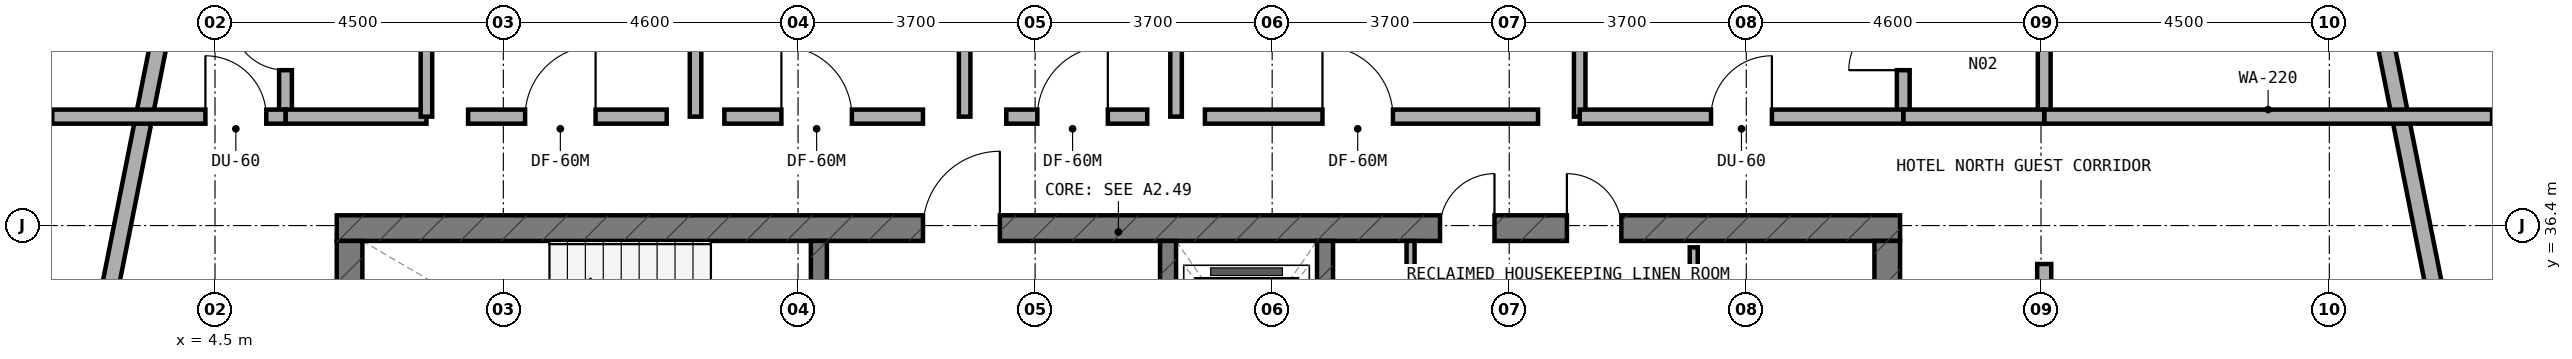
"""IFC4 building model, lengths in metres.
Left out: names, types, materials, properties, quantities, classifications, styles, units other than length and angle.
Written with IfcOpenShell. Run it as: python <this file> out.ifc"""

import sys

from ifc_helpers import new_model, si_unit, direction, frame, frame_2d, origin, place, context, subcontext, project, spatial, rectangle, extrude, element, fill, save


model = new_model("IFC4")
c1 = context("Model", 3, precision=1e-05, world=origin(), true_north=direction((0.0, 1.0)))
c2 = subcontext(c1, "Body", "Model", "MODEL_VIEW")
j1 = project(units=[si_unit("LENGTHUNIT", "METRE"), si_unit("PLANEANGLEUNIT", "RADIAN")], contexts=[c1])
p1 = place(None, origin())
s1 = spatial("IfcSite", under=j1, at=p1, CompositionType="ELEMENT")
p2 = place(p1, origin())
s2 = spatial("IfcBuilding", under=s1, at=p2, CompositionType="ELEMENT")
p3 = place(p2, frame((0.0, 0.0, 231.5)))
s3 = spatial("IfcBuildingStorey", under=s2, at=p3, CompositionType="ELEMENT", Elevation=231.5)
p4 = place(p3, frame((6.4, 36.36, 0.0), z_axis=(0.0, 0.0, 1.0), x_axis=(1.0, 0.0, 0.0)))
e1 = element("IfcWall", 1, at=p4, inside=s3, PredefinedType="SHEAR", context=c2, shape_type="SweptSolid", body=[
    extrude(rectangle(XDim=24.4, YDim=0.4, at=frame_2d((12.2, 0.0))), origin(), (0.0, 0.0, 1.0), 3.6),
])
p5 = place(p4, frame((9.15, 0.0, 0.0)))
e2 = element("IfcOpeningElement", 2, at=p5, cuts=e1, PredefinedType="OPENING", context=c2, shape_type="SweptSolid", body=[
    extrude(rectangle(XDim=1.2, YDim=2.15, at=frame_2d((0.6, 1.075))), frame((0.0, 0.21, 0.0), z_axis=(0.0, -1.0, 0.0), x_axis=(1.0, 0.0, 0.0)), (0.0, 0.0, 1.0), 0.42),
])
p6 = place(p4, frame((19.2, 0.0, 0.0)))
e3 = element("IfcOpeningElement", 3, at=p6, cuts=e1, PredefinedType="OPENING", context=c2, shape_type="SweptSolid", body=[
    extrude(rectangle(XDim=0.85, YDim=2.1, at=frame_2d((0.425, 1.05))), frame((0.0, 0.21, 0.0), z_axis=(0.0, -1.0, 0.0), x_axis=(1.0, 0.0, 0.0)), (0.0, 0.0, 1.0), 0.42),
])
p7 = place(p4, frame((17.22, 0.0, 0.0)))
e4 = element("IfcOpeningElement", 4, at=p7, cuts=e1, PredefinedType="OPENING", context=c2, shape_type="SweptSolid", body=[
    extrude(rectangle(XDim=0.85, YDim=2.1, at=frame_2d((0.425, 1.05))), frame((0.0, 0.21, 0.0), z_axis=(0.0, -1.0, 0.0), x_axis=(1.0, 0.0, 0.0)), (0.0, 0.0, 1.0), 0.42),
])
for number, where, z_axis, x_axis in (
    (5, (6.6, 33.0, 0.0), (0.0, 0.0, 1.0), (0.0, 1.0, 0.0)),
    (6, (30.6, 33.0, 0.0), (0.0, 0.0, 1.0), (0.0, 1.0, 0.0)),
):
    element("IfcWall", number, at=place(p3, frame(where, z_axis=z_axis, x_axis=x_axis)), inside=s3, PredefinedType="SHEAR", context=c2, shape_type="SweptSolid", body=[
        extrude(rectangle(XDim=3.16, YDim=0.4, at=frame_2d((1.58, 0.0))), origin(), (0.0, 0.0, 1.0), 3.6),
    ])
p8 = place(p3, frame((13.925, 33.0, 0.0), z_axis=(0.0, 0.0, 1.0), x_axis=(0.0, 1.0, 0.0)))
e7 = element("IfcWall", 7, at=p8, inside=s3, PredefinedType="STANDARD", context=c2, shape_type="SweptSolid", body=[
    extrude(rectangle(XDim=3.16, YDim=0.25, at=frame_2d((1.58, 0.0))), origin(), (0.0, 0.0, 1.0), 3.32),
])
p9 = place(p8, frame((0.98, 0.0, 0.0)))
e8 = element("IfcOpeningElement", 8, at=p9, cuts=e7, PredefinedType="OPENING", context=c2, shape_type="SweptSolid", body=[
    extrude(rectangle(XDim=1.1, YDim=2.15, at=frame_2d((0.55, 1.075))), frame((0.0, 0.135, 0.0), z_axis=(0.0, -1.0, 0.0), x_axis=(1.0, 0.0, 0.0)), (0.0, 0.0, 1.0), 0.27),
])
p10 = place(p3, frame((19.375, 33.0, 0.0), z_axis=(0.0, 0.0, 1.0), x_axis=(0.0, 1.0, 0.0)))
e9 = element("IfcWall", 9, at=p10, inside=s3, PredefinedType="STANDARD", context=c2, shape_type="SweptSolid", body=[
    extrude(rectangle(XDim=3.16, YDim=0.25, at=frame_2d((1.58, 0.0))), origin(), (0.0, 0.0, 1.0), 3.32),
])
p11 = place(p10, frame((0.98, 0.0, 0.0)))
e10 = element("IfcOpeningElement", 10, at=p11, cuts=e9, PredefinedType="OPENING", context=c2, shape_type="SweptSolid", body=[
    extrude(rectangle(XDim=1.1, YDim=2.15, at=frame_2d((0.55, 1.075))), frame((0.0, 0.135, 0.0), z_axis=(0.0, -1.0, 0.0), x_axis=(1.0, 0.0, 0.0)), (0.0, 0.0, 1.0), 0.27),
])
p12 = place(p3, frame((21.825, 33.0, 0.0), z_axis=(0.0, 0.0, 1.0), x_axis=(0.0, 1.0, 0.0)))
e11 = element("IfcWall", 11, at=p12, inside=s3, PredefinedType="STANDARD", context=c2, shape_type="SweptSolid", body=[
    extrude(rectangle(XDim=3.16, YDim=0.25, at=frame_2d((1.58, 0.0))), origin(), (0.0, 0.0, 1.0), 3.32),
])
p13 = place(p3, frame((40.084, 30.681, 0.0), z_axis=(0.0, 0.0, 1.0), x_axis=(-0.195291715883, 0.980745199176, 0.0)))
e12 = element("IfcWall", 12, at=p13, inside=s3, PredefinedType="STANDARD", context=c2, shape_type="SweptSolid", body=[
    extrude(rectangle(XDim=8.771, YDim=0.26, at=frame_2d((4.385, 0.0))), origin(), (0.0, 0.0, 1.0), 3.32),
])
p14 = place(p13, frame((2.67, 0.0, 0.85)))
e13 = element("IfcOpeningElement", 13, at=p14, cuts=e12, PredefinedType="OPENING", context=c2, shape_type="SweptSolid", body=[
    extrude(rectangle(XDim=2.1, YDim=1.5, at=frame_2d((1.05, 0.75))), frame((0.0, 0.14, 0.0), z_axis=(0.0, -1.0, 0.0), x_axis=(1.0, 0.0, 0.0)), (0.0, 0.0, 1.0), 0.28),
])
p15 = place(p3, frame((3.629, 39.283, 0.0), z_axis=(0.0, 0.0, 1.0), x_axis=(-0.195291715883, -0.980745199176, 0.0)))
e14 = element("IfcWall", 14, at=p15, inside=s3, PredefinedType="STANDARD", context=c2, shape_type="SweptSolid", body=[
    extrude(rectangle(XDim=8.771, YDim=0.26, at=frame_2d((4.385, 0.0))), origin(), (0.0, 0.0, 1.0), 3.32),
])
p16 = place(p15, frame((4.0, 0.0, 0.85)))
e15 = element("IfcOpeningElement", 15, at=p16, cuts=e14, PredefinedType="OPENING", context=c2, shape_type="SweptSolid", body=[
    extrude(rectangle(XDim=2.1, YDim=1.5, at=frame_2d((1.05, 0.75))), frame((0.0, 0.14, 0.0), z_axis=(0.0, -1.0, 0.0), x_axis=(1.0, 0.0, 0.0)), (0.0, 0.0, 1.0), 0.28),
])
p17 = place(p3, frame((27.58, 33.1, 0.0), z_axis=(0.0, 0.0, 1.0), x_axis=(0.0, 1.0, 0.0)))
e16 = element("IfcWall", 16, at=p17, inside=s3, PredefinedType="PARTITIONING", context=c2, shape_type="SweptSolid", body=[
    extrude(rectangle(XDim=2.96, YDim=0.125, at=frame_2d((1.48, 0.0))), origin(), (0.0, 0.0, 1.0), 3.32),
])
p18 = place(p17, frame((1.055, 0.0, 0.0)))
e17 = element("IfcOpeningElement", 17, at=p18, cuts=e16, PredefinedType="OPENING", context=c2, shape_type="SweptSolid", body=[
    extrude(rectangle(XDim=0.85, YDim=2.1, at=frame_2d((0.425, 1.05))), frame((0.0, 0.073, 0.0), z_axis=(0.0, -1.0, 0.0), x_axis=(1.0, 0.0, 0.0)), (0.0, 0.0, 1.0), 0.145),
])
p19 = place(p3, frame((23.16, 34.82, 0.0), z_axis=(0.0, 0.0, 1.0), x_axis=(0.0, 1.0, 0.0)))
e18 = element("IfcWall", 18, at=p19, inside=s3, PredefinedType="PARTITIONING", context=c2, shape_type="SweptSolid", body=[
    extrude(rectangle(XDim=1.34, YDim=0.125, at=frame_2d((0.67, 0.0))), origin(), (0.0, 0.0, 1.0), 3.32),
])
p20 = place(p3, frame((5.6, 38.2, 0.0), z_axis=(0.0, 0.0, 1.0), x_axis=(0.0, 1.0, 0.0)))
e19 = element("IfcWall", 19, at=p20, inside=s3, PredefinedType="PLUMBINGWALL", context=c2, shape_type="SweptSolid", body=[
    extrude(rectangle(XDim=2.1, YDim=0.2, at=frame_2d((1.05, 0.0))), origin(), (0.0, 0.0, 1.0), 3.32),
])
p21 = place(p20, frame((0.625, 0.0, 0.0)))
e20 = element("IfcOpeningElement", 20, at=p21, cuts=e19, PredefinedType="OPENING", context=c2, shape_type="SweptSolid", body=[
    extrude(rectangle(XDim=0.85, YDim=2.1, at=frame_2d((0.425, 1.05))), frame((0.0, 0.11, 0.0), z_axis=(0.0, -1.0, 0.0), x_axis=(1.0, 0.0, 0.0)), (0.0, 0.0, 1.0), 0.22),
])
p22 = place(p3, frame((5.6, 38.1, 0.0), z_axis=(0.0, 0.0, 1.0), x_axis=(1.0, 0.0, 0.0)))
e21 = element("IfcWall", 21, at=p22, inside=s3, PredefinedType="SOLIDWALL", context=c2, shape_type="SweptSolid", body=[
    extrude(rectangle(XDim=2.2, YDim=0.22, at=frame_2d((1.1, 0.0))), origin(), (0.0, 0.0, 1.0), 2.745),
])
p23 = place(p3, frame((1.96, 38.1, 0.0), z_axis=(0.0, 0.0, 1.0), x_axis=(1.0, 0.0, 0.0)))
e22 = element("IfcWall", 22, at=p23, inside=s3, PredefinedType="SOLIDWALL", context=c2, shape_type="SweptSolid", body=[
    extrude(rectangle(XDim=3.64, YDim=0.22, at=frame_2d((1.82, 0.0))), origin(), (0.0, 0.0, 1.0), 3.32),
])
p24 = place(p23, frame((2.39, 0.0, 0.0)))
e23 = element("IfcOpeningElement", 23, at=p24, cuts=e22, PredefinedType="OPENING", context=c2, shape_type="SweptSolid", body=[
    extrude(rectangle(XDim=0.95, YDim=2.1, at=frame_2d((0.475, 1.05))), frame((0.0, 0.12, 0.0), z_axis=(0.0, -1.0, 0.0), x_axis=(1.0, 0.0, 0.0)), (0.0, 0.0, 1.0), 0.24),
])
p25 = place(p3, frame((7.8, 38.1, 0.0), z_axis=(0.0, 0.0, 1.0), x_axis=(0.0, 1.0, 0.0)))
e24 = element("IfcWall", 24, at=p25, inside=s3, PredefinedType="SOLIDWALL", context=c2, shape_type="SweptSolid", body=[
    extrude(rectangle(XDim=4.558, YDim=0.18, at=frame_2d((2.279, 0.0))), origin(), (0.0, 0.0, 1.0), 2.745),
])
p26 = place(p3, frame((12.0, 38.1, 0.0), z_axis=(0.0, 0.0, 1.0), x_axis=(0.0, 1.0, 0.0)))
e25 = element("IfcWall", 25, at=p26, inside=s3, PredefinedType="SOLIDWALL", context=c2, shape_type="SweptSolid", body=[
    extrude(rectangle(XDim=5.394, YDim=0.18, at=frame_2d((2.697, 0.0))), origin(), (0.0, 0.0, 1.0), 2.895),
])
p27 = place(p3, frame((8.45, 38.1, 0.0), z_axis=(0.0, 0.0, 1.0), x_axis=(1.0, 0.0, 0.0)))
e26 = element("IfcWall", 26, at=p27, inside=s3, PredefinedType="SOLIDWALL", context=c2, shape_type="SweptSolid", body=[
    extrude(rectangle(XDim=3.1, YDim=0.22, at=frame_2d((1.55, 0.0))), origin(), (0.0, 0.0, 1.0), 3.32),
])
p28 = place(p27, frame((0.89, 0.0, 0.0)))
e27 = element("IfcOpeningElement", 27, at=p28, cuts=e26, PredefinedType="OPENING", context=c2, shape_type="SweptSolid", body=[
    extrude(rectangle(XDim=1.1, YDim=2.1, at=frame_2d((0.55, 1.05))), frame((0.0, 0.12, 0.0), z_axis=(0.0, -1.0, 0.0), x_axis=(1.0, 0.0, 0.0)), (0.0, 0.0, 1.0), 0.24),
])
p29 = place(p3, frame((12.45, 38.1, 0.0), z_axis=(0.0, 0.0, 1.0), x_axis=(1.0, 0.0, 0.0)))
e28 = element("IfcWall", 28, at=p29, inside=s3, PredefinedType="SOLIDWALL", context=c2, shape_type="SweptSolid", body=[
    extrude(rectangle(XDim=3.1, YDim=0.22, at=frame_2d((1.55, 0.0))), origin(), (0.0, 0.0, 1.0), 3.32),
])
p30 = place(p29, frame((0.89, 0.0, 0.0)))
e29 = element("IfcOpeningElement", 29, at=p30, cuts=e28, PredefinedType="OPENING", context=c2, shape_type="SweptSolid", body=[
    extrude(rectangle(XDim=1.1, YDim=2.1, at=frame_2d((0.55, 1.05))), frame((0.0, 0.12, 0.0), z_axis=(0.0, -1.0, 0.0), x_axis=(1.0, 0.0, 0.0)), (0.0, 0.0, 1.0), 0.24),
])
p31 = place(p3, frame((16.2, 38.1, 0.0), z_axis=(0.0, 0.0, 1.0), x_axis=(0.0, 1.0, 0.0)))
e30 = element("IfcWall", 30, at=p31, inside=s3, PredefinedType="SOLIDWALL", context=c2, shape_type="SweptSolid", body=[
    extrude(rectangle(XDim=6.04, YDim=0.18, at=frame_2d((3.02, 0.0))), origin(), (0.0, 0.0, 1.0), 2.745),
])
p32 = place(p3, frame((19.5, 38.1, 0.0), z_axis=(0.0, 0.0, 1.0), x_axis=(0.0, 1.0, 0.0)))
e31 = element("IfcWall", 31, at=p32, inside=s3, PredefinedType="SOLIDWALL", context=c2, shape_type="SweptSolid", body=[
    extrude(rectangle(XDim=6.04, YDim=0.18, at=frame_2d((3.02, 0.0))), origin(), (0.0, 0.0, 1.0), 2.895),
])
p33 = place(p3, frame((16.85, 38.1, 0.0), z_axis=(0.0, 0.0, 1.0), x_axis=(1.0, 0.0, 0.0)))
e32 = element("IfcWall", 32, at=p33, inside=s3, PredefinedType="SOLIDWALL", context=c2, shape_type="SweptSolid", body=[
    extrude(rectangle(XDim=2.2, YDim=0.22, at=frame_2d((1.1, 0.0))), origin(), (0.0, 0.0, 1.0), 3.32),
])
p34 = place(p33, frame((0.485, 0.0, 0.0)))
e33 = element("IfcOpeningElement", 33, at=p34, cuts=e32, PredefinedType="OPENING", context=c2, shape_type="SweptSolid", body=[
    extrude(rectangle(XDim=1.1, YDim=2.1, at=frame_2d((0.55, 1.05))), frame((0.0, 0.12, 0.0), z_axis=(0.0, -1.0, 0.0), x_axis=(1.0, 0.0, 0.0)), (0.0, 0.0, 1.0), 0.24),
])
p35 = place(p3, frame((19.95, 38.1, 0.0), z_axis=(0.0, 0.0, 1.0), x_axis=(1.0, 0.0, 0.0)))
e34 = element("IfcWall", 34, at=p35, inside=s3, PredefinedType="SOLIDWALL", context=c2, shape_type="SweptSolid", body=[
    extrude(rectangle(XDim=5.2, YDim=0.22, at=frame_2d((2.6, 0.0))), origin(), (0.0, 0.0, 1.0), 3.32),
])
p36 = place(p35, frame((1.835, 0.0, 0.0)))
e35 = element("IfcOpeningElement", 35, at=p36, cuts=e34, PredefinedType="OPENING", context=c2, shape_type="SweptSolid", body=[
    extrude(rectangle(XDim=1.1, YDim=2.1, at=frame_2d((0.55, 1.05))), frame((0.0, 0.12, 0.0), z_axis=(0.0, -1.0, 0.0), x_axis=(1.0, 0.0, 0.0)), (0.0, 0.0, 1.0), 0.24),
])
p37 = place(p3, frame((25.8, 38.1, 0.0), z_axis=(0.0, 0.0, 1.0), x_axis=(0.0, 1.0, 0.0)))
e36 = element("IfcWall", 36, at=p37, inside=s3, PredefinedType="SOLIDWALL", context=c2, shape_type="SweptSolid", body=[
    extrude(rectangle(XDim=6.04, YDim=0.18, at=frame_2d((3.02, 0.0))), origin(), (0.0, 0.0, 1.0), 2.745),
])
p38 = place(p3, frame((30.85, 38.2, 0.0), z_axis=(0.0, 0.0, 1.0), x_axis=(0.0, 1.0, 0.0)))
e37 = element("IfcWall", 37, at=p38, inside=s3, PredefinedType="PLUMBINGWALL", context=c2, shape_type="SweptSolid", body=[
    extrude(rectangle(XDim=2.1, YDim=0.2, at=frame_2d((1.05, 0.0))), origin(), (0.0, 0.0, 1.0), 2.895),
])
p39 = place(p38, frame((0.625, 0.0, 0.0)))
e38 = element("IfcOpeningElement", 38, at=p39, cuts=e37, PredefinedType="OPENING", context=c2, shape_type="SweptSolid", body=[
    extrude(rectangle(XDim=0.85, YDim=2.1, at=frame_2d((0.425, 1.05))), frame((0.0, 0.11, 0.0), z_axis=(0.0, -1.0, 0.0), x_axis=(1.0, 0.0, 0.0)), (0.0, 0.0, 1.0), 0.22),
])
p40 = place(p3, frame((33.05, 38.2, 0.0), z_axis=(0.0, 0.0, 1.0), x_axis=(0.0, 1.0, 0.0)))
e39 = element("IfcWall", 39, at=p40, inside=s3, PredefinedType="PLUMBINGWALL", context=c2, shape_type="SweptSolid", body=[
    extrude(rectangle(XDim=2.1, YDim=0.2, at=frame_2d((1.05, 0.0))), origin(), (0.0, 0.0, 1.0), 2.895),
])
p41 = place(p3, frame((33.05, 38.1, 0.0), z_axis=(0.0, 0.0, 1.0), x_axis=(1.0, 0.0, 0.0)))
e40 = element("IfcWall", 40, at=p41, inside=s3, PredefinedType="SOLIDWALL", context=c2, shape_type="SweptSolid", body=[
    extrude(rectangle(XDim=6.99, YDim=0.22, at=frame_2d((3.495, 0.0))), origin(), (0.0, 0.0, 1.0), 2.745),
])
p42 = place(p3, frame((30.85, 38.1, 0.0), z_axis=(0.0, 0.0, 1.0), x_axis=(1.0, 0.0, 0.0)))
e41 = element("IfcWall", 41, at=p42, inside=s3, PredefinedType="SOLIDWALL", context=c2, shape_type="SweptSolid", body=[
    extrude(rectangle(XDim=2.2, YDim=0.22, at=frame_2d((1.1, 0.0))), origin(), (0.0, 0.0, 1.0), 3.32),
])
p43 = place(p3, frame((25.8, 38.1, 0.0), z_axis=(0.0, 0.0, 1.0), x_axis=(1.0, 0.0, 0.0)))
e42 = element("IfcWall", 42, at=p43, inside=s3, PredefinedType="SOLIDWALL", context=c2, shape_type="SweptSolid", body=[
    extrude(rectangle(XDim=5.05, YDim=0.22, at=frame_2d((2.525, 0.0))), origin(), (0.0, 0.0, 1.0), 2.745),
])
p44 = place(p43, frame((2.05, 0.0, 0.0)))
e43 = element("IfcOpeningElement", 43, at=p44, cuts=e42, PredefinedType="OPENING", context=c2, shape_type="SweptSolid", body=[
    extrude(rectangle(XDim=0.95, YDim=2.1, at=frame_2d((0.475, 1.05))), frame((0.0, 0.12, 0.0), z_axis=(0.0, -1.0, 0.0), x_axis=(1.0, 0.0, 0.0)), (0.0, 0.0, 1.0), 0.24),
])
p45 = place(p3, frame((33.05, 30.593, 0.0), z_axis=(0.0, 0.0, 1.0), x_axis=(0.0, 1.0, 0.0)))
e44 = element("IfcWall", 44, at=p45, inside=s3, PredefinedType="SOLIDWALL", context=c2, shape_type="SweptSolid", body=[
    extrude(rectangle(XDim=5.207, YDim=0.22, at=frame_2d((2.604, 0.0))), origin(), (0.0, 0.0, 1.0), 2.745),
])
p46 = place(p45, frame((2.128, 0.0, 0.0)))
e45 = element("IfcOpeningElement", 45, at=p46, cuts=e44, PredefinedType="OPENING", context=c2, shape_type="SweptSolid", body=[
    extrude(rectangle(XDim=0.95, YDim=2.1, at=frame_2d((0.475, 1.05))), frame((0.0, 0.12, 0.0), z_axis=(0.0, -1.0, 0.0), x_axis=(1.0, 0.0, 0.0)), (0.0, 0.0, 1.0), 0.24),
])
p47 = place(p5, origin())
e46 = element("IfcDoor", 46, at=p47, inside=s3, OperationType="SINGLE_SWING_RIGHT", PredefinedType="DOOR", context=c2, shape_type="SweptSolid", body=[
    extrude(rectangle(XDim=1.2, YDim=2.15, at=frame_2d((0.6, 1.075))), frame((0.0, 0.025, 0.0), z_axis=(0.0, -1.0, 0.0), x_axis=(1.0, 0.0, 0.0)), (0.0, 0.0, 1.0), 0.05),
])
fill(e2, e46)
p48 = place(p6, origin())
e47 = element("IfcDoor", 47, at=p48, inside=s3, OperationType="SINGLE_SWING_LEFT", PredefinedType="DOOR", context=c2, shape_type="SweptSolid", body=[
    extrude(rectangle(XDim=0.85, YDim=2.1, at=frame_2d((0.425, 1.05))), frame((0.0, 0.025, 0.0), z_axis=(0.0, -1.0, 0.0), x_axis=(1.0, 0.0, 0.0)), (0.0, 0.0, 1.0), 0.05),
])
fill(e3, e47)
p49 = place(p7, origin())
e48 = element("IfcDoor", 48, at=p49, inside=s3, OperationType="SINGLE_SWING_RIGHT", PredefinedType="DOOR", context=c2, shape_type="SweptSolid", body=[
    extrude(rectangle(XDim=0.85, YDim=2.1, at=frame_2d((0.425, 1.05))), frame((0.0, 0.025, 0.0), z_axis=(0.0, -1.0, 0.0), x_axis=(1.0, 0.0, 0.0)), (0.0, 0.0, 1.0), 0.05),
])
fill(e4, e48)
p50 = place(p21, origin())
e49 = element("IfcDoor", 49, at=p50, inside=s3, OperationType="SINGLE_SWING_RIGHT", PredefinedType="DOOR", context=c2, shape_type="SweptSolid", body=[
    extrude(rectangle(XDim=0.85, YDim=2.1, at=frame_2d((0.425, 1.05))), frame((0.0, 0.025, 0.0), z_axis=(0.0, -1.0, 0.0), x_axis=(1.0, 0.0, 0.0)), (0.0, 0.0, 1.0), 0.05),
])
fill(e20, e49)
p51 = place(p24, origin())
e50 = element("IfcDoor", 50, at=p51, inside=s3, OperationType="SINGLE_SWING_LEFT", PredefinedType="DOOR", context=c2, shape_type="SweptSolid", body=[
    extrude(rectangle(XDim=0.95, YDim=2.1, at=frame_2d((0.475, 1.05))), frame((0.0, 0.025, 0.0), z_axis=(0.0, -1.0, 0.0), x_axis=(1.0, 0.0, 0.0)), (0.0, 0.0, 1.0), 0.05),
])
fill(e23, e50)
p52 = place(p28, origin())
e51 = element("IfcDoor", 51, at=p52, inside=s3, OperationType="SINGLE_SWING_RIGHT", PredefinedType="DOOR", context=c2, shape_type="SweptSolid", body=[
    extrude(rectangle(XDim=1.1, YDim=2.1, at=frame_2d((0.55, 1.05))), frame((0.0, 0.025, 0.0), z_axis=(0.0, -1.0, 0.0), x_axis=(1.0, 0.0, 0.0)), (0.0, 0.0, 1.0), 0.05),
])
fill(e27, e51)
p53 = place(p30, origin())
e52 = element("IfcDoor", 52, at=p53, inside=s3, OperationType="SINGLE_SWING_LEFT", PredefinedType="DOOR", context=c2, shape_type="SweptSolid", body=[
    extrude(rectangle(XDim=1.1, YDim=2.1, at=frame_2d((0.55, 1.05))), frame((0.0, 0.025, 0.0), z_axis=(0.0, -1.0, 0.0), x_axis=(1.0, 0.0, 0.0)), (0.0, 0.0, 1.0), 0.05),
])
fill(e29, e52)
p54 = place(p34, origin())
e53 = element("IfcDoor", 53, at=p54, inside=s3, OperationType="SINGLE_SWING_RIGHT", PredefinedType="DOOR", context=c2, shape_type="SweptSolid", body=[
    extrude(rectangle(XDim=1.1, YDim=2.1, at=frame_2d((0.55, 1.05))), frame((0.0, 0.025, 0.0), z_axis=(0.0, -1.0, 0.0), x_axis=(1.0, 0.0, 0.0)), (0.0, 0.0, 1.0), 0.05),
])
fill(e33, e53)
p55 = place(p36, origin())
e54 = element("IfcDoor", 54, at=p55, inside=s3, OperationType="SINGLE_SWING_LEFT", PredefinedType="DOOR", context=c2, shape_type="SweptSolid", body=[
    extrude(rectangle(XDim=1.1, YDim=2.1, at=frame_2d((0.55, 1.05))), frame((0.0, 0.025, 0.0), z_axis=(0.0, -1.0, 0.0), x_axis=(1.0, 0.0, 0.0)), (0.0, 0.0, 1.0), 0.05),
])
fill(e35, e54)
p56 = place(p39, origin())
e55 = element("IfcDoor", 55, at=p56, inside=s3, OperationType="SINGLE_SWING_LEFT", PredefinedType="DOOR", context=c2, shape_type="SweptSolid", body=[
    extrude(rectangle(XDim=0.85, YDim=2.1, at=frame_2d((0.425, 1.05))), frame((0.0, 0.025, 0.0), z_axis=(0.0, -1.0, 0.0), x_axis=(1.0, 0.0, 0.0)), (0.0, 0.0, 1.0), 0.05),
])
fill(e38, e55)
p57 = place(p44, origin())
e56 = element("IfcDoor", 56, at=p57, inside=s3, OperationType="SINGLE_SWING_RIGHT", PredefinedType="DOOR", context=c2, shape_type="SweptSolid", body=[
    extrude(rectangle(XDim=0.95, YDim=2.1, at=frame_2d((0.475, 1.05))), frame((0.0, 0.025, 0.0), z_axis=(0.0, -1.0, 0.0), x_axis=(1.0, 0.0, 0.0)), (0.0, 0.0, 1.0), 0.05),
])
fill(e43, e56)
save(model, sys.argv[1])
